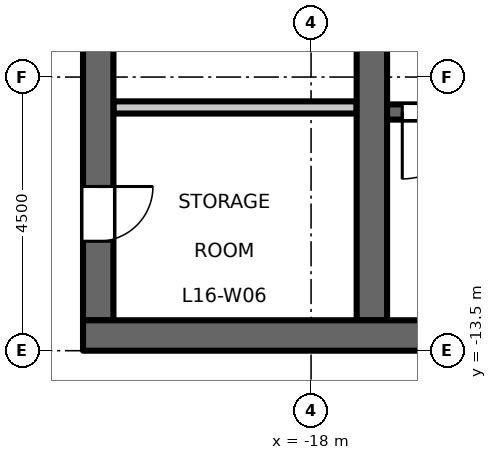
"""IFC4 building model, lengths in metres.
Left out: names, types, materials, properties, quantities, classifications, styles, units other than length and angle.
Written with IfcOpenShell. Run it as: python <this file> out.ifc"""

import sys

from ifc_helpers import new_model, si_unit, direction, frame, frame_2d, origin, place, context, subcontext, project, spatial, rectangle, extrude, element, fill, save


model = new_model("IFC4")
c1 = context("Model", 3, precision=1e-05, world=origin(), true_north=direction((0.0, 1.0)))
c2 = subcontext(c1, "Body", "Model", "MODEL_VIEW")
j1 = project(units=[si_unit("LENGTHUNIT", "METRE"), si_unit("PLANEANGLEUNIT", "RADIAN")], contexts=[c1])
p1 = place(None, origin())
s1 = spatial("IfcSite", under=j1, at=p1, CompositionType="ELEMENT")
p2 = place(p1, origin())
s2 = spatial("IfcBuilding", under=s1, at=p2, CompositionType="ELEMENT")
p3 = place(p2, frame((0.0, 0.0, 76.2)))
s3 = spatial("IfcBuildingStorey", under=s2, at=p3, CompositionType="ELEMENT", Elevation=76.2)
p4 = place(p3, frame((-21.5, -13.0, 0.0), z_axis=(0.0, 0.0, 1.0), x_axis=(0.0, 1.0, 0.0)))
e1 = element("IfcWall", 1, at=p4, inside=s3, PredefinedType="SHEAR", context=c2, shape_type="SweptSolid", body=[
    extrude(rectangle(XDim=26.0, YDim=0.5, at=frame_2d((13.0, 0.0))), origin(), (0.0, 0.0, 1.0), 4.35),
])
p5 = place(p4, frame((16.825, 0.0, 0.0)))
e2 = element("IfcOpeningElement", 2, at=p5, cuts=e1, PredefinedType="OPENING", context=c2, shape_type="SweptSolid", body=[
    extrude(rectangle(XDim=1.8, YDim=2.1, at=frame_2d((0.9, 1.05))), frame((0.0, 0.26, 0.0), z_axis=(0.0, -1.0, 0.0), x_axis=(1.0, 0.0, 0.0)), (0.0, 0.0, 1.0), 0.52),
])
p6 = place(p4, frame((7.375, 0.0, 0.0)))
e3 = element("IfcOpeningElement", 3, at=p6, cuts=e1, PredefinedType="OPENING", context=c2, shape_type="SweptSolid", body=[
    extrude(rectangle(XDim=1.8, YDim=2.1, at=frame_2d((0.9, 1.05))), frame((0.0, 0.26, 0.0), z_axis=(0.0, -1.0, 0.0), x_axis=(1.0, 0.0, 0.0)), (0.0, 0.0, 1.0), 0.52),
])
p7 = place(p4, frame((1.3, 0.0, 0.0)))
e4 = element("IfcOpeningElement", 4, at=p7, cuts=e1, PredefinedType="OPENING", context=c2, shape_type="SweptSolid", body=[
    extrude(rectangle(XDim=0.9, YDim=2.1, at=frame_2d((0.45, 1.05))), frame((0.0, 0.26, 0.0), z_axis=(0.0, -1.0, 0.0), x_axis=(1.0, 0.0, 0.0)), (0.0, 0.0, 1.0), 0.52),
])
p8 = place(p3, frame((-17.25, -9.5, 0.0), z_axis=(0.0, 0.0, 1.0), x_axis=(-1.0, 0.0, 0.0)))
e5 = element("IfcWall", 5, at=p8, inside=s3, PredefinedType="PARTITIONING", context=c2, shape_type="SweptSolid", body=[
    extrude(rectangle(XDim=4.0, YDim=0.2, at=frame_2d((2.0, 0.0))), origin(), (0.0, 0.0, 1.0), 4.35),
])
p9 = place(p3, frame((-17.0, -13.0, 0.0), z_axis=(0.0, 0.0, 1.0), x_axis=(0.0, 1.0, 0.0)))
e6 = element("IfcWall", 6, at=p9, inside=s3, PredefinedType="SHEAR", context=c2, shape_type="SweptSolid", body=[
    extrude(rectangle(XDim=6.575, YDim=0.5, at=frame_2d((3.288, 0.0))), origin(), (0.0, 0.0, 1.0), 4.35),
])
p10 = place(p3, frame((-8.75, -9.575, 0.0), z_axis=(0.0, 0.0, 1.0), x_axis=(-1.0, 0.0, 0.0)))
e7 = element("IfcWall", 7, at=p10, inside=s3, PredefinedType="SHEAR", context=c2, shape_type="SweptSolid", body=[
    extrude(rectangle(XDim=8.0, YDim=0.25, at=frame_2d((4.0, 0.0))), origin(), (0.0, 0.0, 1.0), 4.35),
])
p11 = place(p10, frame((6.65, 0.0, 0.0)))
e8 = element("IfcOpeningElement", 8, at=p11, cuts=e7, PredefinedType="OPENING", context=c2, shape_type="SweptSolid", body=[
    extrude(rectangle(XDim=1.1, YDim=2.1, at=frame_2d((0.55, 1.05))), frame((0.0, 0.135, 0.0), z_axis=(0.0, -1.0, 0.0), x_axis=(1.0, 0.0, 0.0)), (0.0, 0.0, 1.0), 0.27),
])
p12 = place(p3, frame((-8.25, -13.25, 0.0), z_axis=(0.0, 0.0, 1.0), x_axis=(-1.0, 0.0, 0.0)))
e9 = element("IfcWall", 9, at=p12, inside=s3, PredefinedType="SHEAR", context=c2, shape_type="SweptSolid", body=[
    extrude(rectangle(XDim=13.5, YDim=0.5, at=frame_2d((6.75, 0.0))), origin(), (0.0, 0.0, 1.0), 4.35),
])
p13 = place(p11, origin())
e10 = element("IfcDoor", 10, at=p13, inside=s3, OperationType="SINGLE_SWING_LEFT", PredefinedType="DOOR", context=c2, shape_type="SweptSolid", body=[
    extrude(rectangle(XDim=1.1, YDim=2.1, at=frame_2d((0.55, 1.05))), frame((0.0, 0.025, 0.0), z_axis=(0.0, -1.0, 0.0), x_axis=(1.0, 0.0, 0.0)), (0.0, 0.0, 1.0), 0.05),
])
fill(e8, e10)
p14 = place(p7, origin())
e11 = element("IfcDoor", 11, at=p14, inside=s3, OperationType="SINGLE_SWING_RIGHT", PredefinedType="DOOR", context=c2, shape_type="SweptSolid", body=[
    extrude(rectangle(XDim=0.9, YDim=2.1, at=frame_2d((0.45, 1.05))), frame((0.0, 0.025, 0.0), z_axis=(0.0, -1.0, 0.0), x_axis=(1.0, 0.0, 0.0)), (0.0, 0.0, 1.0), 0.05),
])
fill(e4, e11)
save(model, sys.argv[1])
